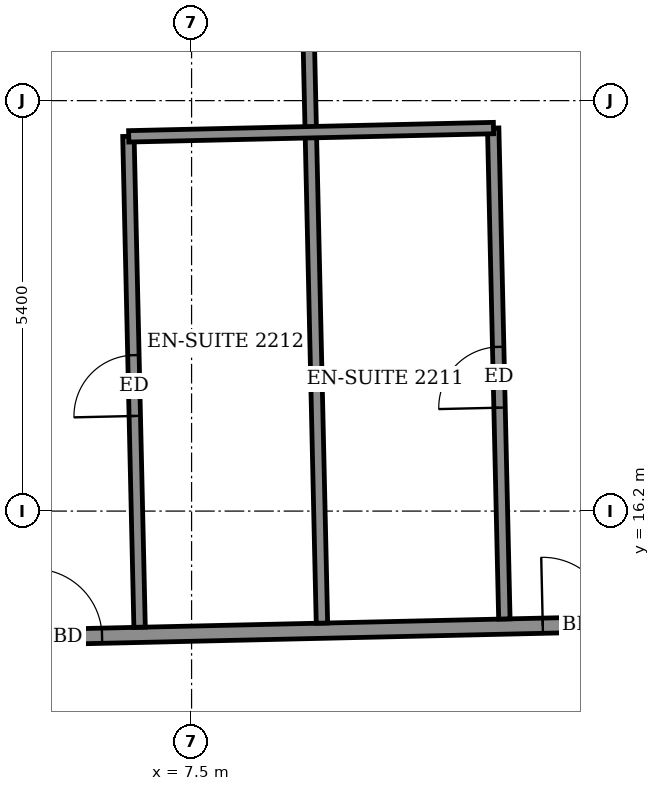
"""IFC4 building model, lengths in metres.
Left out: names, types, materials, properties, quantities, classifications, styles, units other than length and angle.
Written with IfcOpenShell. Run it as: python <this file> out.ifc"""

import sys

from ifc_helpers import new_model, si_unit, direction, frame, frame_2d, origin, place, context, subcontext, project, spatial, rectangle, extrude, element, fill, save


model = new_model("IFC4")
c1 = context("Model", 3, precision=1e-05, world=origin(), true_north=direction((0.0, 1.0)))
c2 = subcontext(c1, "Body", "Model", "MODEL_VIEW")
j1 = project(units=[si_unit("LENGTHUNIT", "METRE"), si_unit("PLANEANGLEUNIT", "RADIAN")], contexts=[c1])
p1 = place(None, origin())
s1 = spatial("IfcSite", under=j1, at=p1, CompositionType="ELEMENT")
p2 = place(p1, origin())
s2 = spatial("IfcBuilding", under=s1, at=p2, CompositionType="ELEMENT")
p3 = place(p2, frame((0.0, 0.0, 90.1)))
s3 = spatial("IfcBuildingStorey", under=s2, at=p3, CompositionType="ELEMENT", Elevation=90.1)
p4 = place(p3, frame((-24.92, 13.851, 0.0), z_axis=(0.0, 0.0, 1.0), x_axis=(0.999742411711, 0.022696039895, 0.0)))
e1 = element("IfcWall", 1, at=p4, inside=s3, PredefinedType="PARTITIONING", context=c2, shape_type="SweptSolid", body=[
    extrude(rectangle(XDim=52.472, YDim=0.2, at=frame_2d((26.236, 0.0))), origin(), (0.0, 0.0, 1.0), 3.05),
])
p5 = place(p4, frame((50.088, 0.0, 0.0)))
e2 = element("IfcOpeningElement", 2, at=p5, cuts=e1, PredefinedType="OPENING", context=c2, shape_type="SweptSolid", body=[
    extrude(rectangle(XDim=1.0, YDim=2.1, at=frame_2d((0.5, 1.05))), frame((0.0, 0.11, 0.0), z_axis=(0.0, -1.0, 0.0), x_axis=(1.0, 0.0, 0.0)), (0.0, 0.0, 1.0), 0.22),
])
p6 = place(p4, frame((45.725, 0.0, 0.0)))
e3 = element("IfcOpeningElement", 3, at=p6, cuts=e1, PredefinedType="OPENING", context=c2, shape_type="SweptSolid", body=[
    extrude(rectangle(XDim=0.9, YDim=2.1, at=frame_2d((0.45, 1.05))), frame((0.0, 0.11, 0.0), z_axis=(0.0, -1.0, 0.0), x_axis=(1.0, 0.0, 0.0)), (0.0, 0.0, 1.0), 0.22),
])
p7 = place(p4, frame((38.975, 0.0, 0.0)))
e4 = element("IfcOpeningElement", 4, at=p7, cuts=e1, PredefinedType="OPENING", context=c2, shape_type="SweptSolid", body=[
    extrude(rectangle(XDim=0.9, YDim=2.1, at=frame_2d((0.45, 1.05))), frame((0.0, 0.11, 0.0), z_axis=(0.0, -1.0, 0.0), x_axis=(1.0, 0.0, 0.0)), (0.0, 0.0, 1.0), 0.22),
])
p8 = place(p4, frame((37.05, 0.0, 0.0)))
e5 = element("IfcOpeningElement", 5, at=p8, cuts=e1, PredefinedType="OPENING", context=c2, shape_type="SweptSolid", body=[
    extrude(rectangle(XDim=0.9, YDim=2.1, at=frame_2d((0.45, 1.05))), frame((0.0, 0.11, 0.0), z_axis=(0.0, -1.0, 0.0), x_axis=(1.0, 0.0, 0.0)), (0.0, 0.0, 1.0), 0.22),
])
p9 = place(p4, frame((30.35, 0.0, 0.0)))
e6 = element("IfcOpeningElement", 6, at=p9, cuts=e1, PredefinedType="OPENING", context=c2, shape_type="SweptSolid", body=[
    extrude(rectangle(XDim=0.9, YDim=2.1, at=frame_2d((0.45, 1.05))), frame((0.0, 0.11, 0.0), z_axis=(0.0, -1.0, 0.0), x_axis=(1.0, 0.0, 0.0)), (0.0, 0.0, 1.0), 0.22),
])
p10 = place(p4, frame((28.4, 0.0, 0.0)))
e7 = element("IfcOpeningElement", 7, at=p10, cuts=e1, PredefinedType="OPENING", context=c2, shape_type="SweptSolid", body=[
    extrude(rectangle(XDim=0.9, YDim=2.1, at=frame_2d((0.45, 1.05))), frame((0.0, 0.11, 0.0), z_axis=(0.0, -1.0, 0.0), x_axis=(1.0, 0.0, 0.0)), (0.0, 0.0, 1.0), 0.22),
])
p11 = place(p4, frame((21.675, 0.0, 0.0)))
e8 = element("IfcOpeningElement", 8, at=p11, cuts=e1, PredefinedType="OPENING", context=c2, shape_type="SweptSolid", body=[
    extrude(rectangle(XDim=0.9, YDim=2.1, at=frame_2d((0.45, 1.05))), frame((0.0, 0.11, 0.0), z_axis=(0.0, -1.0, 0.0), x_axis=(1.0, 0.0, 0.0)), (0.0, 0.0, 1.0), 0.22),
])
p12 = place(p4, frame((19.775, 0.0, 0.0)))
e9 = element("IfcOpeningElement", 9, at=p12, cuts=e1, PredefinedType="OPENING", context=c2, shape_type="SweptSolid", body=[
    extrude(rectangle(XDim=0.9, YDim=2.1, at=frame_2d((0.45, 1.05))), frame((0.0, 0.11, 0.0), z_axis=(0.0, -1.0, 0.0), x_axis=(1.0, 0.0, 0.0)), (0.0, 0.0, 1.0), 0.22),
])
p13 = place(p4, frame((13.0, 0.0, 0.0)))
e10 = element("IfcOpeningElement", 10, at=p13, cuts=e1, PredefinedType="OPENING", context=c2, shape_type="SweptSolid", body=[
    extrude(rectangle(XDim=0.9, YDim=2.1, at=frame_2d((0.45, 1.05))), frame((0.0, 0.11, 0.0), z_axis=(0.0, -1.0, 0.0), x_axis=(1.0, 0.0, 0.0)), (0.0, 0.0, 1.0), 0.22),
])
p14 = place(p4, frame((11.075, 0.0, 0.0)))
e11 = element("IfcOpeningElement", 11, at=p14, cuts=e1, PredefinedType="OPENING", context=c2, shape_type="SweptSolid", body=[
    extrude(rectangle(XDim=0.9, YDim=2.1, at=frame_2d((0.45, 1.05))), frame((0.0, 0.11, 0.0), z_axis=(0.0, -1.0, 0.0), x_axis=(1.0, 0.0, 0.0)), (0.0, 0.0, 1.0), 0.22),
])
p15 = place(p4, frame((3.049, 0.0, 0.0)))
e12 = element("IfcOpeningElement", 12, at=p15, cuts=e1, PredefinedType="OPENING", context=c2, shape_type="SweptSolid", body=[
    extrude(rectangle(XDim=1.0, YDim=2.1, at=frame_2d((0.5, 1.05))), frame((0.0, 0.11, 0.0), z_axis=(0.0, -1.0, 0.0), x_axis=(1.0, 0.0, 0.0)), (0.0, 0.0, 1.0), 0.22),
])
p16 = place(p3, frame((6.816, 14.672, 0.0), z_axis=(0.0, 0.0, 1.0), x_axis=(-0.022753171905, 0.999741113073, 0.0)))
e13 = element("IfcWall", 13, at=p16, inside=s3, PredefinedType="PARTITIONING", context=c2, shape_type="SweptSolid", body=[
    extrude(rectangle(XDim=6.459, YDim=0.15, at=frame_2d((3.23, 0.0))), origin(), (0.0, 0.0, 1.0), 3.05),
])
p17 = place(p16, frame((2.78, 0.0, 0.0)))
e14 = element("IfcOpeningElement", 14, at=p17, cuts=e13, PredefinedType="OPENING", context=c2, shape_type="SweptSolid", body=[
    extrude(rectangle(XDim=0.8, YDim=2.1, at=frame_2d((0.4, 1.05))), frame((0.0, 0.085, 0.0), z_axis=(0.0, -1.0, 0.0), x_axis=(1.0, 0.0, 0.0)), (0.0, 0.0, 1.0), 0.17),
])
p18 = place(p3, frame((9.215, 14.726, 0.0), z_axis=(0.0, 0.0, 1.0), x_axis=(-0.022661475803, 0.999743195783, 0.0)))
e15 = element("IfcWall", 15, at=p18, inside=s3, PredefinedType="PARTITIONING", context=c2, shape_type="SweptSolid", body=[
    extrude(rectangle(XDim=12.4, YDim=0.15, at=frame_2d((6.2, 0.0))), origin(), (0.0, 0.0, 1.0), 2.55),
])
p19 = place(p3, frame((11.615, 14.781, 0.0), z_axis=(0.0, 0.0, 1.0), x_axis=(-0.022752312182, 0.999741132639, 0.0)))
e16 = element("IfcWall", 16, at=p19, inside=s3, PredefinedType="PARTITIONING", context=c2, shape_type="SweptSolid", body=[
    extrude(rectangle(XDim=6.46, YDim=0.15, at=frame_2d((3.23, 0.0))), origin(), (0.0, 0.0, 1.0), 3.05),
])
p20 = place(p19, frame((2.78, 0.0, 0.0)))
e17 = element("IfcOpeningElement", 17, at=p20, cuts=e16, PredefinedType="OPENING", context=c2, shape_type="SweptSolid", body=[
    extrude(rectangle(XDim=0.8, YDim=2.1, at=frame_2d((0.4, 1.05))), frame((0.0, 0.085, 0.0), z_axis=(0.0, -1.0, 0.0), x_axis=(1.0, 0.0, 0.0)), (0.0, 0.0, 1.0), 0.17),
])
p21 = place(p3, frame((6.673, 21.13, 0.0), z_axis=(0.0, 0.0, 1.0), x_axis=(0.999741520352, 0.022735269617, 0.0)))
e18 = element("IfcWall", 18, at=p21, inside=s3, PredefinedType="PARTITIONING", context=c2, shape_type="SweptSolid", body=[
    extrude(rectangle(XDim=4.8, YDim=0.15, at=frame_2d((2.4, 0.0))), origin(), (0.0, 0.0, 1.0), 3.05),
])
p22 = place(p8, origin())
e19 = element("IfcDoor", 19, at=p22, inside=s3, OperationType="SINGLE_SWING_LEFT", PredefinedType="DOOR", context=c2, shape_type="SweptSolid", body=[
    extrude(rectangle(XDim=0.9, YDim=2.1, at=frame_2d((0.45, 1.05))), frame((0.0, 0.025, 0.0), z_axis=(0.0, -1.0, 0.0), x_axis=(1.0, 0.0, 0.0)), (0.0, 0.0, 1.0), 0.05),
])
fill(e5, e19)
p23 = place(p20, origin())
e20 = element("IfcDoor", 20, at=p23, inside=s3, OperationType="SINGLE_SWING_LEFT", PredefinedType="DOOR", context=c2, shape_type="SweptSolid", body=[
    extrude(rectangle(XDim=0.8, YDim=2.1, at=frame_2d((0.4, 1.05))), frame((0.0, 0.025, 0.0), z_axis=(0.0, -1.0, 0.0), x_axis=(1.0, 0.0, 0.0)), (0.0, 0.0, 1.0), 0.05),
])
fill(e17, e20)
p24 = place(p9, origin())
e21 = element("IfcDoor", 21, at=p24, inside=s3, OperationType="SINGLE_SWING_RIGHT", PredefinedType="DOOR", context=c2, shape_type="SweptSolid", body=[
    extrude(rectangle(XDim=0.9, YDim=2.1, at=frame_2d((0.45, 1.05))), frame((0.0, 0.025, 0.0), z_axis=(0.0, -1.0, 0.0), x_axis=(1.0, 0.0, 0.0)), (0.0, 0.0, 1.0), 0.05),
])
fill(e6, e21)
p25 = place(p17, origin())
e22 = element("IfcDoor", 22, at=p25, inside=s3, OperationType="SINGLE_SWING_RIGHT", PredefinedType="DOOR", context=c2, shape_type="SweptSolid", body=[
    extrude(rectangle(XDim=0.8, YDim=2.1, at=frame_2d((0.4, 1.05))), frame((0.0, 0.025, 0.0), z_axis=(0.0, -1.0, 0.0), x_axis=(1.0, 0.0, 0.0)), (0.0, 0.0, 1.0), 0.05),
])
fill(e14, e22)
save(model, sys.argv[1])
